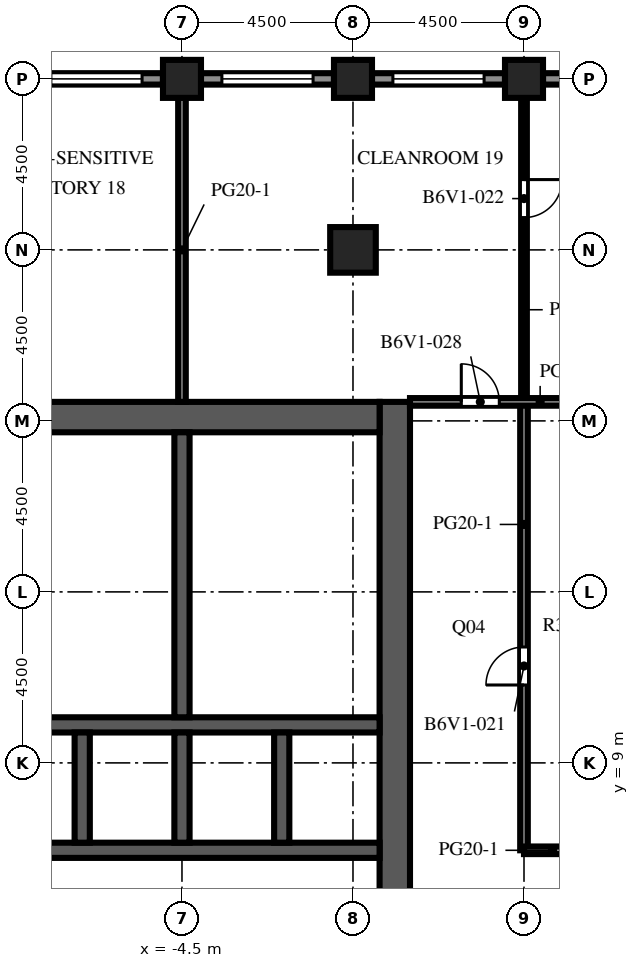
"""IFC4 building model, lengths in metres.
Left out: names, types, materials, properties, quantities, classifications, styles, units other than length and angle.
Written with IfcOpenShell. Run it as: python <this file> out.ifc"""

import sys

from ifc_helpers import new_model, si_unit, direction, frame, frame_2d, origin, origin_2d, place, context, subcontext, project, spatial, rectangle, extrude, element, fill, save


model = new_model("IFC4")
c1 = context("Model", 3, precision=1e-05, world=origin(), true_north=direction((0.0, 1.0)))
c2 = subcontext(c1, "Body", "Model", "MODEL_VIEW")
j1 = project(units=[si_unit("LENGTHUNIT", "METRE"), si_unit("PLANEANGLEUNIT", "RADIAN")], contexts=[c1])
p1 = place(None, origin())
s1 = spatial("IfcSite", under=j1, at=p1, CompositionType="ELEMENT")
p2 = place(p1, origin())
s2 = spatial("IfcBuilding", under=s1, at=p2, CompositionType="ELEMENT")
p3 = place(p2, frame((0.0, 0.0, 212.0)))
s3 = spatial("IfcBuildingStorey", under=s2, at=p3, CompositionType="ELEMENT", Elevation=212.0)
for number, where, z_axis, x_axis in (
    (1, (-4.5, 27.0, 0.0), (0.0, 0.0, 1.0), (1.0, 0.0, 0.0)),
    (2, (0.0, 27.0, 0.0), (0.0, 0.0, 1.0), (1.0, 0.0, 0.0)),
    (3, (4.5, 27.0, 0.0), (0.0, 0.0, 1.0), (1.0, 0.0, 0.0)),
):
    element("IfcColumn", number, at=place(p3, frame(where, z_axis=z_axis, x_axis=x_axis)), inside=s3, PredefinedType="COLUMN", context=c2, shape_type="SweptSolid", body=[
        extrude(rectangle(XDim=1.0, YDim=1.0, at=origin_2d()), origin(), (0.0, 0.0, 1.0), 4.1),
    ])
p4 = place(p3, frame((0.0, 22.5, 0.0), z_axis=(0.0, 0.0, 1.0), x_axis=(1.0, 0.0, 0.0)))
e4 = element("IfcColumn", 4, at=p4, inside=s3, PredefinedType="COLUMN", context=c2, shape_type="SweptSolid", body=[
    extrude(rectangle(XDim=1.2, YDim=1.2, at=origin_2d()), origin(), (0.0, 0.0, 1.0), 4.1),
])
p5 = place(p3, frame((1.1, -9.0, 0.0), z_axis=(0.0, 0.0, 1.0), x_axis=(0.0, 1.0, 0.0)))
e5 = element("IfcWall", 5, at=p5, inside=s3, PredefinedType="SHEAR", context=c2, shape_type="SweptSolid", body=[
    extrude(rectangle(XDim=27.5, YDim=0.8, at=frame_2d((13.75, 0.0))), origin(), (0.0, 0.0, 1.0), 4.1),
])
p6 = place(p5, frame((12.55, 0.0, 0.0)))
e6 = element("IfcOpeningElement", 6, at=p6, cuts=e5, PredefinedType="OPENING", context=c2, shape_type="SweptSolid", body=[
    extrude(rectangle(XDim=2.4, YDim=2.4, at=frame_2d((1.2, 1.2))), frame((0.0, 0.41, 0.0), z_axis=(0.0, -1.0, 0.0), x_axis=(1.0, 0.0, 0.0)), (0.0, 0.0, 1.0), 0.82),
])
p7 = place(p5, frame((3.95, 0.0, 0.0)))
e7 = element("IfcOpeningElement", 7, at=p7, cuts=e5, PredefinedType="OPENING", context=c2, shape_type="SweptSolid", body=[
    extrude(rectangle(XDim=1.2, YDim=2.1, at=frame_2d((0.6, 1.05))), frame((0.0, 0.41, 0.0), z_axis=(0.0, -1.0, 0.0), x_axis=(1.0, 0.0, 0.0)), (0.0, 0.0, 1.0), 0.82),
])
p8 = place(p5, frame((22.35, 0.0, 0.0)))
e8 = element("IfcOpeningElement", 8, at=p8, cuts=e5, PredefinedType="OPENING", context=c2, shape_type="SweptSolid", body=[
    extrude(rectangle(XDim=1.2, YDim=2.1, at=frame_2d((0.6, 1.05))), frame((0.0, 0.41, 0.0), z_axis=(0.0, -1.0, 0.0), x_axis=(1.0, 0.0, 0.0)), (0.0, 0.0, 1.0), 0.82),
])
p9 = place(p3, frame((-9.7, 18.1, 0.0), z_axis=(0.0, 0.0, 1.0), x_axis=(1.0, 0.0, 0.0)))
e9 = element("IfcWall", 9, at=p9, inside=s3, PredefinedType="SHEAR", context=c2, shape_type="SweptSolid", body=[
    extrude(rectangle(XDim=10.4, YDim=0.8, at=frame_2d((5.2, 0.0))), origin(), (0.0, 0.0, 1.0), 4.1),
])
p10 = place(p3, frame((-9.7, 6.7, 0.0), z_axis=(0.0, 0.0, 1.0), x_axis=(1.0, 0.0, 0.0)))
e10 = element("IfcWall", 10, at=p10, inside=s3, PredefinedType="SHEAR", context=c2, shape_type="SweptSolid", body=[
    extrude(rectangle(XDim=10.4, YDim=0.4, at=frame_2d((5.2, 0.0))), origin(), (0.0, 0.0, 1.0), 4.1),
])
p11 = place(p10, frame((3.337, 0.0, 0.0)))
e11 = element("IfcOpeningElement", 11, at=p11, cuts=e10, PredefinedType="OPENING", context=c2, shape_type="SweptSolid", body=[
    extrude(rectangle(XDim=1.1, YDim=2.1, at=frame_2d((0.55, 1.05))), frame((0.0, 0.21, 0.0), z_axis=(0.0, -1.0, 0.0), x_axis=(1.0, 0.0, 0.0)), (0.0, 0.0, 1.0), 0.42),
])
p12 = place(p10, frame((5.962, 0.0, 0.0)))
e12 = element("IfcOpeningElement", 12, at=p12, cuts=e10, PredefinedType="OPENING", context=c2, shape_type="SweptSolid", body=[
    extrude(rectangle(XDim=1.1, YDim=2.1, at=frame_2d((0.55, 1.05))), frame((0.0, 0.21, 0.0), z_axis=(0.0, -1.0, 0.0), x_axis=(1.0, 0.0, 0.0)), (0.0, 0.0, 1.0), 0.42),
])
p13 = place(p10, frame((8.663, 0.0, 0.0)))
e13 = element("IfcOpeningElement", 13, at=p13, cuts=e10, PredefinedType="OPENING", context=c2, shape_type="SweptSolid", body=[
    extrude(rectangle(XDim=1.1, YDim=2.1, at=frame_2d((0.55, 1.05))), frame((0.0, 0.21, 0.0), z_axis=(0.0, -1.0, 0.0), x_axis=(1.0, 0.0, 0.0)), (0.0, 0.0, 1.0), 0.42),
])
p14 = place(p10, frame((0.688, 0.0, 0.0)))
e14 = element("IfcOpeningElement", 14, at=p14, cuts=e10, PredefinedType="OPENING", context=c2, shape_type="SweptSolid", body=[
    extrude(rectangle(XDim=1.0, YDim=2.1, at=frame_2d((0.5, 1.05))), frame((0.0, 0.21, 0.0), z_axis=(0.0, -1.0, 0.0), x_axis=(1.0, 0.0, 0.0)), (0.0, 0.0, 1.0), 0.42),
])
p15 = place(p3, frame((-9.7, 10.0, 0.0), z_axis=(0.0, 0.0, 1.0), x_axis=(1.0, 0.0, 0.0)))
e15 = element("IfcWall", 15, at=p15, inside=s3, PredefinedType="SHEAR", context=c2, shape_type="SweptSolid", body=[
    extrude(rectangle(XDim=10.4, YDim=0.4, at=frame_2d((5.2, 0.0))), origin(), (0.0, 0.0, 1.0), 4.1),
])
for number, where, z_axis, x_axis in (
    (16, (-7.125, 6.9, 0.0), (0.0, 0.0, 1.0), (0.0, 1.0, 0.0)),
    (17, (-4.5, 6.9, 0.0), (0.0, 0.0, 1.0), (0.0, 1.0, 0.0)),
    (18, (-1.875, 6.9, 0.0), (0.0, 0.0, 1.0), (0.0, 1.0, 0.0)),
):
    element("IfcWall", number, at=place(p3, frame(where, z_axis=z_axis, x_axis=x_axis)), inside=s3, PredefinedType="SHEAR", context=c2, shape_type="SweptSolid", body=[
        extrude(rectangle(XDim=2.9, YDim=0.4, at=frame_2d((1.45, 0.0))), origin(), (0.0, 0.0, 1.0), 4.1),
    ])
p16 = place(p3, frame((-4.5, 10.2, 0.0), z_axis=(0.0, 0.0, 1.0), x_axis=(0.0, 1.0, 0.0)))
e19 = element("IfcWall", 19, at=p16, inside=s3, PredefinedType="SHEAR", context=c2, shape_type="SweptSolid", body=[
    extrude(rectangle(XDim=7.5, YDim=0.4, at=frame_2d((3.75, 0.0))), origin(), (0.0, 0.0, 1.0), 4.1),
])
p17 = place(p3, frame((5.0, 27.0, 0.0), z_axis=(0.0, 0.0, 1.0), x_axis=(1.0, 0.0, 0.0)))
e20 = element("IfcWall", 20, at=p17, inside=s3, PredefinedType="SOLIDWALL", context=c2, shape_type="SweptSolid", body=[
    extrude(rectangle(XDim=3.5, YDim=0.3, at=frame_2d((1.75, 0.0))), origin(), (0.0, 0.0, 1.0), 2.85),
])
p18 = place(p17, frame((0.55, 0.0, 0.8)))
e21 = element("IfcOpeningElement", 21, at=p18, cuts=e20, PredefinedType="OPENING", context=c2, shape_type="SweptSolid", body=[
    extrude(rectangle(XDim=2.4, YDim=1.7, at=frame_2d((1.2, 0.85))), frame((0.0, 0.16, 0.0), z_axis=(0.0, -1.0, 0.0), x_axis=(1.0, 0.0, 0.0)), (0.0, 0.0, 1.0), 0.32),
])
p19 = place(p3, frame((0.5, 27.0, 0.0), z_axis=(0.0, 0.0, 1.0), x_axis=(1.0, 0.0, 0.0)))
e22 = element("IfcWall", 22, at=p19, inside=s3, PredefinedType="SOLIDWALL", context=c2, shape_type="SweptSolid", body=[
    extrude(rectangle(XDim=3.5, YDim=0.3, at=frame_2d((1.75, 0.0))), origin(), (0.0, 0.0, 1.0), 2.85),
])
p20 = place(p19, frame((0.55, 0.0, 0.8)))
e23 = element("IfcOpeningElement", 23, at=p20, cuts=e22, PredefinedType="OPENING", context=c2, shape_type="SweptSolid", body=[
    extrude(rectangle(XDim=2.4, YDim=1.7, at=frame_2d((1.2, 0.85))), frame((0.0, 0.16, 0.0), z_axis=(0.0, -1.0, 0.0), x_axis=(1.0, 0.0, 0.0)), (0.0, 0.0, 1.0), 0.32),
])
p21 = place(p3, frame((-4.0, 27.0, 0.0), z_axis=(0.0, 0.0, 1.0), x_axis=(1.0, 0.0, 0.0)))
e24 = element("IfcWall", 24, at=p21, inside=s3, PredefinedType="SOLIDWALL", context=c2, shape_type="SweptSolid", body=[
    extrude(rectangle(XDim=3.5, YDim=0.3, at=frame_2d((1.75, 0.0))), origin(), (0.0, 0.0, 1.0), 2.85),
])
p22 = place(p21, frame((0.55, 0.0, 0.8)))
e25 = element("IfcOpeningElement", 25, at=p22, cuts=e24, PredefinedType="OPENING", context=c2, shape_type="SweptSolid", body=[
    extrude(rectangle(XDim=2.4, YDim=1.7, at=frame_2d((1.2, 0.85))), frame((0.0, 0.16, 0.0), z_axis=(0.0, -1.0, 0.0), x_axis=(1.0, 0.0, 0.0)), (0.0, 0.0, 1.0), 0.32),
])
p23 = place(p3, frame((-8.5, 27.0, 0.0), z_axis=(0.0, 0.0, 1.0), x_axis=(1.0, 0.0, 0.0)))
e26 = element("IfcWall", 26, at=p23, inside=s3, PredefinedType="SOLIDWALL", context=c2, shape_type="SweptSolid", body=[
    extrude(rectangle(XDim=3.5, YDim=0.3, at=frame_2d((1.75, 0.0))), origin(), (0.0, 0.0, 1.0), 2.85),
])
p24 = place(p23, frame((0.55, 0.0, 0.8)))
e27 = element("IfcOpeningElement", 27, at=p24, cuts=e26, PredefinedType="OPENING", context=c2, shape_type="SweptSolid", body=[
    extrude(rectangle(XDim=2.4, YDim=1.7, at=frame_2d((1.2, 0.85))), frame((0.0, 0.16, 0.0), z_axis=(0.0, -1.0, 0.0), x_axis=(1.0, 0.0, 0.0)), (0.0, 0.0, 1.0), 0.32),
])
p25 = place(p3, frame((-0.7, 10.2, 0.0), z_axis=(0.0, 0.0, 1.0), x_axis=(0.0, 1.0, 0.0)))
e28 = element("IfcWall", 28, at=p25, inside=s3, PredefinedType="PARTITIONING", context=c2, shape_type="SweptSolid", body=[
    extrude(rectangle(XDim=2.25, YDim=0.1, at=frame_2d((1.125, 0.0))), origin(), (0.0, 0.0, 1.0), 3.65),
])
p26 = place(p25, frame((0.625, 0.0, 0.0)))
e29 = element("IfcOpeningElement", 29, at=p26, cuts=e28, PredefinedType="OPENING", context=c2, shape_type="SweptSolid", body=[
    extrude(rectangle(XDim=1.0, YDim=2.1, at=frame_2d((0.5, 1.05))), frame((0.0, 0.06, 0.0), z_axis=(0.0, -1.0, 0.0), x_axis=(1.0, 0.0, 0.0)), (0.0, 0.0, 1.0), 0.12),
])
p27 = place(p3, frame((-0.7, 12.45, 0.0), z_axis=(0.0, 0.0, 1.0), x_axis=(0.0, 1.0, 0.0)))
e30 = element("IfcWall", 30, at=p27, inside=s3, PredefinedType="PARTITIONING", context=c2, shape_type="SweptSolid", body=[
    extrude(rectangle(XDim=2.4, YDim=0.1, at=frame_2d((1.2, 0.0))), origin(), (0.0, 0.0, 1.0), 3.65),
])
p28 = place(p27, frame((0.7, 0.0, 0.0)))
e31 = element("IfcOpeningElement", 31, at=p28, cuts=e30, PredefinedType="OPENING", context=c2, shape_type="SweptSolid", body=[
    extrude(rectangle(XDim=1.0, YDim=2.1, at=frame_2d((0.5, 1.05))), frame((0.0, 0.06, 0.0), z_axis=(0.0, -1.0, 0.0), x_axis=(1.0, 0.0, 0.0)), (0.0, 0.0, 1.0), 0.12),
])
p29 = place(p3, frame((-0.7, 14.85, 0.0), z_axis=(0.0, 0.0, 1.0), x_axis=(0.0, 1.0, 0.0)))
e32 = element("IfcWall", 32, at=p29, inside=s3, PredefinedType="PARTITIONING", context=c2, shape_type="SweptSolid", body=[
    extrude(rectangle(XDim=2.85, YDim=0.1, at=frame_2d((1.425, 0.0))), origin(), (0.0, 0.0, 1.0), 3.65),
])
p30 = place(p29, frame((0.925, 0.0, 0.0)))
e33 = element("IfcOpeningElement", 33, at=p30, cuts=e32, PredefinedType="OPENING", context=c2, shape_type="SweptSolid", body=[
    extrude(rectangle(XDim=1.0, YDim=2.1, at=frame_2d((0.5, 1.05))), frame((0.0, 0.06, 0.0), z_axis=(0.0, -1.0, 0.0), x_axis=(1.0, 0.0, 0.0)), (0.0, 0.0, 1.0), 0.12),
])
for number, where, z_axis, x_axis in (
    (34, (-4.3, 12.45, 0.0), (0.0, 0.0, 1.0), (1.0, 0.0, 0.0)),
    (35, (-4.3, 14.85, 0.0), (0.0, 0.0, 1.0), (1.0, 0.0, 0.0)),
):
    element("IfcWall", number, at=place(p3, frame(where, z_axis=z_axis, x_axis=x_axis)), inside=s3, PredefinedType="PARTITIONING", context=c2, shape_type="SweptSolid", body=[
        extrude(rectangle(XDim=3.6, YDim=0.1, at=frame_2d((1.8, 0.0))), origin(), (0.0, 0.0, 1.0), 3.65),
    ])
p31 = place(p3, frame((-4.5, 18.5, 0.0), z_axis=(0.0, 0.0, 1.0), x_axis=(0.0, 1.0, 0.0)))
e36 = element("IfcWall", 36, at=p31, inside=s3, PredefinedType="PARTITIONING", context=c2, shape_type="SweptSolid", body=[
    extrude(rectangle(XDim=8.0, YDim=0.2, at=frame_2d((4.0, 0.0))), origin(), (0.0, 0.0, 1.0), 3.65),
])
p32 = place(p3, frame((4.5, 26.5, 0.0), z_axis=(0.0, 0.0, 1.0), x_axis=(0.0, -1.0, 0.0)))
e37 = element("IfcWall", 37, at=p32, inside=s3, PredefinedType="PARTITIONING", context=c2, shape_type="SweptSolid", body=[
    extrude(rectangle(XDim=8.0, YDim=0.15, at=frame_2d((4.0, 0.0))), origin(), (0.0, 0.0, 1.0), 3.65),
])
p33 = place(p32, frame((2.15, 0.0, 0.0)))
e38 = element("IfcOpeningElement", 38, at=p33, cuts=e37, PredefinedType="OPENING", context=c2, shape_type="SweptSolid", body=[
    extrude(rectangle(XDim=1.0, YDim=2.1, at=frame_2d((0.5, 1.05))), frame((0.0, 0.085, 0.0), z_axis=(0.0, -1.0, 0.0), x_axis=(1.0, 0.0, 0.0)), (0.0, 0.0, 1.0), 0.17),
])
p34 = place(p3, frame((4.5, 18.5, 0.0), z_axis=(0.0, 0.0, 1.0), x_axis=(0.0, -1.0, 0.0)))
e39 = element("IfcWall", 39, at=p34, inside=s3, PredefinedType="PARTITIONING", context=c2, shape_type="SweptSolid", body=[
    extrude(rectangle(XDim=11.8, YDim=0.2, at=frame_2d((5.9, 0.0))), origin(), (0.0, 0.0, 1.0), 3.65),
])
p35 = place(p34, frame((6.45, 0.0, 0.0)))
e40 = element("IfcOpeningElement", 40, at=p35, cuts=e39, PredefinedType="OPENING", context=c2, shape_type="SweptSolid", body=[
    extrude(rectangle(XDim=1.0, YDim=2.1, at=frame_2d((0.5, 1.05))), frame((0.0, 0.11, 0.0), z_axis=(0.0, -1.0, 0.0), x_axis=(1.0, 0.0, 0.0)), (0.0, 0.0, 1.0), 0.22),
])
p36 = place(p3, frame((4.5, 6.7, 0.0), z_axis=(0.0, 0.0, 1.0), x_axis=(1.0, 0.0, 0.0)))
e41 = element("IfcWall", 41, at=p36, inside=s3, PredefinedType="PARTITIONING", context=c2, shape_type="SweptSolid", body=[
    extrude(rectangle(XDim=1.5, YDim=0.2, at=frame_2d((0.75, 0.0))), origin(), (0.0, 0.0, 1.0), 3.65),
])
p37 = place(p3, frame((1.5, 18.5, 0.0), z_axis=(0.0, 0.0, 1.0), x_axis=(1.0, 0.0, 0.0)))
e42 = element("IfcWall", 42, at=p37, inside=s3, PredefinedType="PARTITIONING", context=c2, shape_type="SweptSolid", body=[
    extrude(rectangle(XDim=4.5, YDim=0.2, at=frame_2d((2.25, 0.0))), origin(), (0.0, 0.0, 1.0), 3.65),
])
p38 = place(p37, frame((1.35, 0.0, 0.0)))
e43 = element("IfcOpeningElement", 43, at=p38, cuts=e42, PredefinedType="OPENING", context=c2, shape_type="SweptSolid", body=[
    extrude(rectangle(XDim=1.0, YDim=2.1, at=frame_2d((0.5, 1.05))), frame((0.0, 0.11, 0.0), z_axis=(0.0, -1.0, 0.0), x_axis=(1.0, 0.0, 0.0)), (0.0, 0.0, 1.0), 0.22),
])
p39 = place(p20, origin())
e44 = element("IfcWindow", 44, at=p39, inside=s3, PartitioningType="SINGLE_PANEL", PredefinedType="WINDOW", context=c2, shape_type="SweptSolid", body=[
    extrude(rectangle(XDim=2.4, YDim=1.7, at=frame_2d((1.2, 0.85))), frame((0.0, 0.03, 0.0), z_axis=(0.0, -1.0, 0.0), x_axis=(1.0, 0.0, 0.0)), (0.0, 0.0, 1.0), 0.06),
])
fill(e23, e44)
p40 = place(p22, origin())
e45 = element("IfcWindow", 45, at=p40, inside=s3, PartitioningType="SINGLE_PANEL", PredefinedType="WINDOW", context=c2, shape_type="SweptSolid", body=[
    extrude(rectangle(XDim=2.4, YDim=1.7, at=frame_2d((1.2, 0.85))), frame((0.0, 0.03, 0.0), z_axis=(0.0, -1.0, 0.0), x_axis=(1.0, 0.0, 0.0)), (0.0, 0.0, 1.0), 0.06),
])
fill(e25, e45)
p41 = place(p24, origin())
e46 = element("IfcWindow", 46, at=p41, inside=s3, PartitioningType="SINGLE_PANEL", PredefinedType="WINDOW", context=c2, shape_type="SweptSolid", body=[
    extrude(rectangle(XDim=2.4, YDim=1.7, at=frame_2d((1.2, 0.85))), frame((0.0, 0.03, 0.0), z_axis=(0.0, -1.0, 0.0), x_axis=(1.0, 0.0, 0.0)), (0.0, 0.0, 1.0), 0.06),
])
fill(e27, e46)
p42 = place(p11, origin())
e47 = element("IfcDoor", 47, at=p42, inside=s3, OperationType="DOUBLE_DOOR_SLIDING", PredefinedType="DOOR", context=c2, shape_type="SweptSolid", body=[
    extrude(rectangle(XDim=1.1, YDim=2.1, at=frame_2d((0.55, 1.05))), frame((0.0, 0.025, 0.0), z_axis=(0.0, -1.0, 0.0), x_axis=(1.0, 0.0, 0.0)), (0.0, 0.0, 1.0), 0.05),
])
fill(e11, e47)
p43 = place(p12, origin())
e48 = element("IfcDoor", 48, at=p43, inside=s3, OperationType="DOUBLE_DOOR_SLIDING", PredefinedType="DOOR", context=c2, shape_type="SweptSolid", body=[
    extrude(rectangle(XDim=1.1, YDim=2.1, at=frame_2d((0.55, 1.05))), frame((0.0, 0.025, 0.0), z_axis=(0.0, -1.0, 0.0), x_axis=(1.0, 0.0, 0.0)), (0.0, 0.0, 1.0), 0.05),
])
fill(e12, e48)
p44 = place(p13, origin())
e49 = element("IfcDoor", 49, at=p44, inside=s3, OperationType="DOUBLE_DOOR_SLIDING", PredefinedType="DOOR", context=c2, shape_type="SweptSolid", body=[
    extrude(rectangle(XDim=1.1, YDim=2.1, at=frame_2d((0.55, 1.05))), frame((0.0, 0.025, 0.0), z_axis=(0.0, -1.0, 0.0), x_axis=(1.0, 0.0, 0.0)), (0.0, 0.0, 1.0), 0.05),
])
fill(e13, e49)
p45 = place(p6, origin())
e50 = element("IfcDoor", 50, at=p45, inside=s3, OperationType="DOUBLE_DOOR_DOUBLE_SWING", PredefinedType="DOOR", context=c2, shape_type="SweptSolid", body=[
    extrude(rectangle(XDim=2.4, YDim=2.4, at=frame_2d((1.2, 1.2))), frame((0.0, 0.025, 0.0), z_axis=(0.0, -1.0, 0.0), x_axis=(1.0, 0.0, 0.0)), (0.0, 0.0, 1.0), 0.05),
])
fill(e6, e50)
p46 = place(p8, origin())
e51 = element("IfcDoor", 51, at=p46, inside=s3, OperationType="SINGLE_SWING_LEFT", PredefinedType="DOOR", context=c2, shape_type="SweptSolid", body=[
    extrude(rectangle(XDim=1.2, YDim=2.1, at=frame_2d((0.6, 1.05))), frame((0.0, 0.375, 0.0), z_axis=(0.0, -1.0, 0.0), x_axis=(1.0, 0.0, 0.0)), (0.0, 0.0, 1.0), 0.05),
])
fill(e8, e51)
p47 = place(p26, origin())
e52 = element("IfcDoor", 52, at=p47, inside=s3, OperationType="SINGLE_SWING_RIGHT", PredefinedType="DOOR", context=c2, shape_type="SweptSolid", body=[
    extrude(rectangle(XDim=1.0, YDim=2.1, at=frame_2d((0.5, 1.05))), frame((0.0, 0.025, 0.0), z_axis=(0.0, -1.0, 0.0), x_axis=(1.0, 0.0, 0.0)), (0.0, 0.0, 1.0), 0.05),
])
fill(e29, e52)
p48 = place(p28, origin())
e53 = element("IfcDoor", 53, at=p48, inside=s3, OperationType="SINGLE_SWING_LEFT", PredefinedType="DOOR", context=c2, shape_type="SweptSolid", body=[
    extrude(rectangle(XDim=1.0, YDim=2.1, at=frame_2d((0.5, 1.05))), frame((0.0, 0.025, 0.0), z_axis=(0.0, -1.0, 0.0), x_axis=(1.0, 0.0, 0.0)), (0.0, 0.0, 1.0), 0.05),
])
fill(e31, e53)
p49 = place(p30, origin())
e54 = element("IfcDoor", 54, at=p49, inside=s3, OperationType="SINGLE_SWING_RIGHT", PredefinedType="DOOR", context=c2, shape_type="SweptSolid", body=[
    extrude(rectangle(XDim=1.0, YDim=2.1, at=frame_2d((0.5, 1.05))), frame((0.0, 0.025, 0.0), z_axis=(0.0, -1.0, 0.0), x_axis=(1.0, 0.0, 0.0)), (0.0, 0.0, 1.0), 0.05),
])
fill(e33, e54)
p50 = place(p35, origin())
e55 = element("IfcDoor", 55, at=p50, inside=s3, OperationType="SINGLE_SWING_RIGHT", PredefinedType="DOOR", context=c2, shape_type="SweptSolid", body=[
    extrude(rectangle(XDim=1.0, YDim=2.1, at=frame_2d((0.5, 1.05))), frame((0.0, 0.025, 0.0), z_axis=(0.0, -1.0, 0.0), x_axis=(1.0, 0.0, 0.0)), (0.0, 0.0, 1.0), 0.05),
])
fill(e40, e55)
p51 = place(p33, origin())
e56 = element("IfcDoor", 56, at=p51, inside=s3, OperationType="SINGLE_SWING_LEFT", PredefinedType="DOOR", context=c2, shape_type="SweptSolid", body=[
    extrude(rectangle(XDim=1.0, YDim=2.1, at=frame_2d((0.5, 1.05))), frame((0.0, 0.025, 0.0), z_axis=(0.0, -1.0, 0.0), x_axis=(1.0, 0.0, 0.0)), (0.0, 0.0, 1.0), 0.05),
])
fill(e38, e56)
p52 = place(p38, origin())
e57 = element("IfcDoor", 57, at=p52, inside=s3, OperationType="SINGLE_SWING_LEFT", PredefinedType="DOOR", context=c2, shape_type="SweptSolid", body=[
    extrude(rectangle(XDim=1.0, YDim=2.1, at=frame_2d((0.5, 1.05))), frame((0.0, 0.025, 0.0), z_axis=(0.0, -1.0, 0.0), x_axis=(1.0, 0.0, 0.0)), (0.0, 0.0, 1.0), 0.05),
])
fill(e43, e57)
save(model, sys.argv[1])
